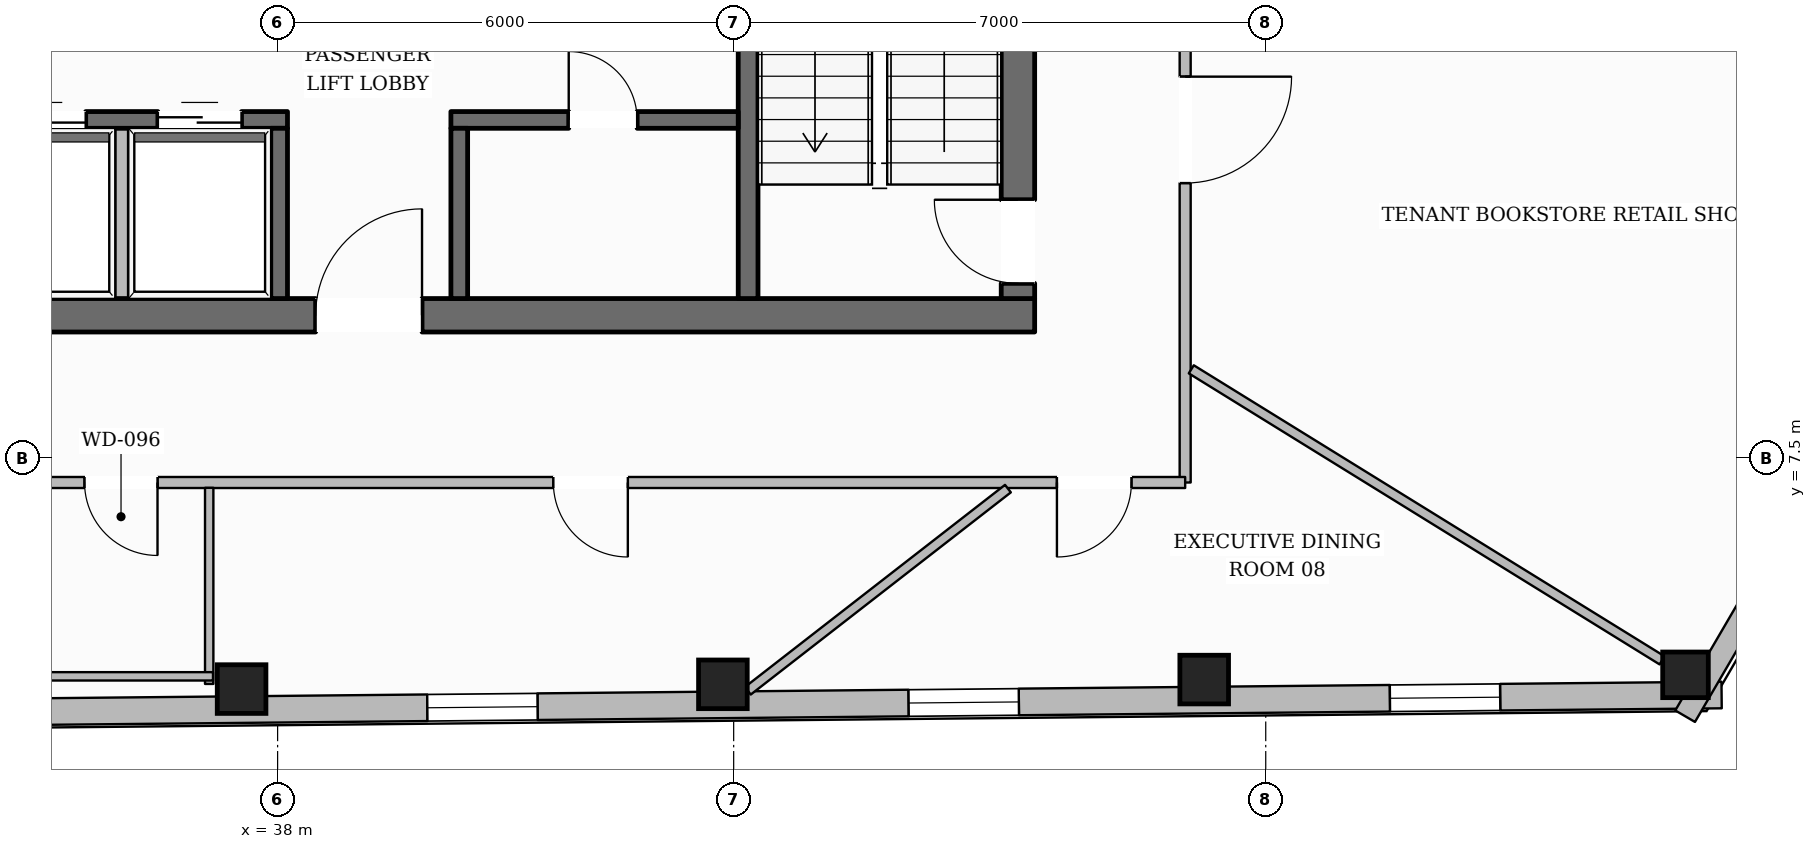
"""IFC4 building model, lengths in metres.
Left out: names, types, materials, properties, quantities, classifications, styles, units other than length and angle.
Written with IfcOpenShell. Run it as: python <this file> out.ifc"""

import sys

from ifc_helpers import new_model, si_unit, direction, frame, frame_2d, origin, origin_2d, place, context, subcontext, project, spatial, rectangle, hollow_rectangle, extrude, element, fill, save


model = new_model("IFC4")
c1 = context("Model", 3, precision=1e-05, world=origin(), true_north=direction((0.0, 1.0)))
c2 = subcontext(c1, "Body", "Model", "MODEL_VIEW")
j1 = project(units=[si_unit("LENGTHUNIT", "METRE"), si_unit("PLANEANGLEUNIT", "RADIAN")], contexts=[c1])
p1 = place(None, origin())
s1 = spatial("IfcSite", under=j1, at=p1, CompositionType="ELEMENT")
p2 = place(p1, origin())
s2 = spatial("IfcBuilding", under=s1, at=p2, CompositionType="ELEMENT")
p3 = place(p2, frame((0.0, 0.0, 218.9)))
s3 = spatial("IfcBuildingStorey", under=s2, at=p3, CompositionType="ELEMENT", Elevation=218.9)
p4 = place(p3, frame((28.04, 9.38, 0.0), z_axis=(0.0, 0.0, 1.0), x_axis=(1.0, 0.0, 0.0)))
e1 = element("IfcWall", 1, at=p4, inside=s3, PredefinedType="SOLIDWALL", context=c2, shape_type="SweptSolid", body=[
    extrude(rectangle(XDim=19.92, YDim=0.44, at=frame_2d((9.96, 0.0))), origin(), (0.0, 0.0, 1.0), 3.6),
])
p5 = place(p4, frame((10.46, 0.0, 0.0)))
e2 = element("IfcOpeningElement", 2, at=p5, cuts=e1, PredefinedType="OPENING", context=c2, shape_type="SweptSolid", body=[
    extrude(rectangle(XDim=1.4, YDim=2.2, at=frame_2d((0.7, 1.1))), frame((0.0, 0.23, 0.0), z_axis=(0.0, -1.0, 0.0), x_axis=(1.0, 0.0, 0.0)), (0.0, 0.0, 1.0), 0.46),
])
p6 = place(p3, frame((47.74, 9.6, 0.0), z_axis=(0.0, 0.0, 1.0), x_axis=(0.0, 1.0, 0.0)))
e3 = element("IfcWall", 3, at=p6, inside=s3, PredefinedType="SOLIDWALL", context=c2, shape_type="SweptSolid", body=[
    extrude(rectangle(XDim=13.0, YDim=0.44, at=frame_2d((6.5, 0.0))), origin(), (0.0, 0.0, 1.0), 3.6),
])
p7 = place(p6, frame((0.2, 0.0, 0.0)))
e4 = element("IfcOpeningElement", 4, at=p7, cuts=e3, PredefinedType="OPENING", context=c2, shape_type="SweptSolid", body=[
    extrude(rectangle(XDim=1.1, YDim=2.15, at=frame_2d((0.55, 1.075))), frame((0.0, 0.23, 0.0), z_axis=(0.0, -1.0, 0.0), x_axis=(1.0, 0.0, 0.0)), (0.0, 0.0, 1.0), 0.46),
])
p8 = place(p6, frame((8.4, 0.0, 0.0)))
e5 = element("IfcOpeningElement", 5, at=p8, cuts=e3, PredefinedType="OPENING", context=c2, shape_type="SweptSolid", body=[
    extrude(rectangle(XDim=0.9, YDim=2.1, at=frame_2d((0.45, 1.05))), frame((0.0, 0.23, 0.0), z_axis=(0.0, -1.0, 0.0), x_axis=(1.0, 0.0, 0.0)), (0.0, 0.0, 1.0), 0.46),
])
p9 = place(p3, frame((44.19, 9.6, 0.0), z_axis=(0.0, 0.0, 1.0), x_axis=(0.0, 1.0, 0.0)))
e6 = element("IfcWall", 6, at=p9, inside=s3, PredefinedType="SHEAR", context=c2, shape_type="SweptSolid", body=[
    extrude(rectangle(XDim=13.0, YDim=0.26, at=frame_2d((6.5, 0.0))), origin(), (0.0, 0.0, 1.0), 3.6),
])
p10 = place(p9, frame((10.925, 0.0, 0.0)))
e7 = element("IfcOpeningElement", 7, at=p10, cuts=e6, PredefinedType="OPENING", context=c2, shape_type="SweptSolid", body=[
    extrude(rectangle(XDim=1.25, YDim=2.25, at=frame_2d((0.625, 1.125))), frame((0.0, 0.14, 0.0), z_axis=(0.0, -1.0, 0.0), x_axis=(1.0, 0.0, 0.0)), (0.0, 0.0, 1.0), 0.28),
])
p11 = place(p3, frame((31.94, 11.95, 0.0), z_axis=(0.0, 0.0, 1.0), x_axis=(1.0, 0.0, 0.0)))
e8 = element("IfcWall", 8, at=p11, inside=s3, PredefinedType="SOLIDWALL", context=c2, shape_type="SweptSolid", body=[
    extrude(rectangle(XDim=6.19, YDim=0.22, at=frame_2d((3.095, 0.0))), origin(), (0.0, 0.0, 1.0), 3.6),
])
p12 = place(p11, frame((0.385, 0.0, 0.0)))
e9 = element("IfcOpeningElement", 9, at=p12, cuts=e8, PredefinedType="OPENING", context=c2, shape_type="SweptSolid", body=[
    extrude(rectangle(XDim=1.1, YDim=2.2, at=frame_2d((0.55, 1.1))), frame((0.0, 0.12, 0.0), z_axis=(0.0, -1.0, 0.0), x_axis=(1.0, 0.0, 0.0)), (0.0, 0.0, 1.0), 0.24),
])
p13 = place(p11, frame((2.435, 0.0, 0.0)))
e10 = element("IfcOpeningElement", 10, at=p13, cuts=e8, PredefinedType="OPENING", context=c2, shape_type="SweptSolid", body=[
    extrude(rectangle(XDim=1.1, YDim=2.2, at=frame_2d((0.55, 1.1))), frame((0.0, 0.12, 0.0), z_axis=(0.0, -1.0, 0.0), x_axis=(1.0, 0.0, 0.0)), (0.0, 0.0, 1.0), 0.24),
])
p14 = place(p11, frame((4.485, 0.0, 0.0)))
e11 = element("IfcOpeningElement", 11, at=p14, cuts=e8, PredefinedType="OPENING", context=c2, shape_type="SweptSolid", body=[
    extrude(rectangle(XDim=1.1, YDim=2.2, at=frame_2d((0.55, 1.1))), frame((0.0, 0.12, 0.0), z_axis=(0.0, -1.0, 0.0), x_axis=(1.0, 0.0, 0.0)), (0.0, 0.0, 1.0), 0.24),
])
p15 = place(p3, frame((40.28, 11.95, 0.0), z_axis=(0.0, 0.0, 1.0), x_axis=(1.0, 0.0, 0.0)))
e12 = element("IfcWall", 12, at=p15, inside=s3, PredefinedType="SOLIDWALL", context=c2, shape_type="SweptSolid", body=[
    extrude(rectangle(XDim=3.78, YDim=0.22, at=frame_2d((1.89, 0.0))), origin(), (0.0, 0.0, 1.0), 3.6),
])
p16 = place(p15, frame((1.55, 0.0, 0.0)))
e13 = element("IfcOpeningElement", 13, at=p16, cuts=e12, PredefinedType="OPENING", context=c2, shape_type="SweptSolid", body=[
    extrude(rectangle(XDim=0.9, YDim=2.1, at=frame_2d((0.45, 1.05))), frame((0.0, 0.12, 0.0), z_axis=(0.0, -1.0, 0.0), x_axis=(1.0, 0.0, 0.0)), (0.0, 0.0, 1.0), 0.24),
])
for number, where, z_axis, x_axis in (
    (14, (38.02, 9.6, 0.0), (0.0, 0.0, 1.0), (0.0, 1.0, 0.0)),
    (15, (40.39, 9.6, 0.0), (0.0, 0.0, 1.0), (0.0, 1.0, 0.0)),
):
    element("IfcWall", number, at=place(p3, frame(where, z_axis=z_axis, x_axis=x_axis)), inside=s3, PredefinedType="SOLIDWALL", context=c2, shape_type="SweptSolid", body=[
        extrude(rectangle(XDim=2.24, YDim=0.22, at=frame_2d((1.12, 0.0))), origin(), (0.0, 0.0, 1.0), 3.6),
    ])
for number, where, z_axis, x_axis in (
    (16, (37.526, 4.462, 0.0), (0.0, 0.0, 1.0), (1.0, 0.0, 0.0)),
    (17, (43.858, 4.525, 0.0), (0.0, 0.0, 1.0), (1.0, 0.0, 0.0)),
    (18, (50.19, 4.587, 0.0), (0.0, 0.0, 1.0), (1.0, 0.0, 0.0)),
):
    element("IfcColumn", number, at=place(p3, frame(where, z_axis=z_axis, x_axis=x_axis)), inside=s3, PredefinedType="COLUMN", context=c2, shape_type="SweptSolid", body=[
        extrude(hollow_rectangle(XDim=0.64, YDim=0.64, WallThickness=0.028, at=origin_2d()), origin(), (0.0, 0.0, 1.0), 3.6),
    ])
p17 = place(p3, frame((56.522, 4.65, 0.0), z_axis=(0.0, 0.0, 1.0), x_axis=(1.0, 0.0, 0.0)))
e19 = element("IfcColumn", 19, at=p17, inside=s3, PredefinedType="COLUMN", context=c2, shape_type="SweptSolid", body=[
    extrude(hollow_rectangle(XDim=0.6, YDim=0.6, WallThickness=0.028, at=origin_2d()), origin(), (0.0, 0.0, 1.0), 3.6),
])
p18 = place(p3, frame((56.998, 4.385, 0.0), z_axis=(0.0, 0.0, 1.0), x_axis=(-0.999951327982, -0.009866188108, 0.0)))
e20 = element("IfcWall", 20, at=p18, inside=s3, PredefinedType="STANDARD", context=c2, shape_type="SweptSolid", body=[
    extrude(rectangle(XDim=38.949, YDim=0.35, at=frame_2d((19.475, 0.0))), origin(), (0.0, 0.0, 1.0), 3.132),
])
p19 = place(p18, frame((34.576, 0.0, 0.65)))
e21 = element("IfcOpeningElement", 21, at=p19, cuts=e20, PredefinedType="OPENING", context=c2, shape_type="SweptSolid", body=[
    extrude(rectangle(XDim=1.45, YDim=1.75, at=frame_2d((0.725, 0.875))), frame((0.0, 0.185, 0.0), z_axis=(0.0, -1.0, 0.0), x_axis=(1.0, 0.0, 0.0)), (0.0, 0.0, 1.0), 0.37),
])
p20 = place(p18, frame((28.243, 0.0, 0.65)))
e22 = element("IfcOpeningElement", 22, at=p20, cuts=e20, PredefinedType="OPENING", context=c2, shape_type="SweptSolid", body=[
    extrude(rectangle(XDim=1.45, YDim=1.75, at=frame_2d((0.725, 0.875))), frame((0.0, 0.185, 0.0), z_axis=(0.0, -1.0, 0.0), x_axis=(1.0, 0.0, 0.0)), (0.0, 0.0, 1.0), 0.37),
])
p21 = place(p18, frame((15.579, 0.0, 0.65)))
e23 = element("IfcOpeningElement", 23, at=p21, cuts=e20, PredefinedType="OPENING", context=c2, shape_type="SweptSolid", body=[
    extrude(rectangle(XDim=1.45, YDim=1.75, at=frame_2d((0.725, 0.875))), frame((0.0, 0.185, 0.0), z_axis=(0.0, -1.0, 0.0), x_axis=(1.0, 0.0, 0.0)), (0.0, 0.0, 1.0), 0.37),
])
p22 = place(p18, frame((9.246, 0.0, 0.65)))
e24 = element("IfcOpeningElement", 24, at=p22, cuts=e20, PredefinedType="OPENING", context=c2, shape_type="SweptSolid", body=[
    extrude(rectangle(XDim=1.45, YDim=1.75, at=frame_2d((0.725, 0.875))), frame((0.0, 0.185, 0.0), z_axis=(0.0, -1.0, 0.0), x_axis=(1.0, 0.0, 0.0)), (0.0, 0.0, 1.0), 0.37),
])
p23 = place(p18, frame((2.914, 0.0, 0.65)))
e25 = element("IfcOpeningElement", 25, at=p23, cuts=e20, PredefinedType="OPENING", context=c2, shape_type="SweptSolid", body=[
    extrude(rectangle(XDim=1.45, YDim=1.75, at=frame_2d((0.725, 0.875))), frame((0.0, 0.185, 0.0), z_axis=(0.0, -1.0, 0.0), x_axis=(1.0, 0.0, 0.0)), (0.0, 0.0, 1.0), 0.37),
])
p24 = place(p3, frame((61.026, 11.828, 0.0), z_axis=(0.0, 0.0, 1.0), x_axis=(-0.504220681264, -0.863574840176, 0.0)))
e26 = element("IfcWall", 26, at=p24, inside=s3, PredefinedType="STANDARD", context=c2, shape_type="SweptSolid", body=[
    extrude(rectangle(XDim=8.942, YDim=0.3, at=frame_2d((4.471, 0.0))), origin(), (0.0, 0.0, 1.0), 3.132),
])
p25 = place(p24, frame((3.946, 0.0, 0.65)))
e27 = element("IfcOpeningElement", 27, at=p25, cuts=e26, PredefinedType="OPENING", context=c2, shape_type="SweptSolid", body=[
    extrude(rectangle(XDim=1.05, YDim=1.7, at=frame_2d((0.525, 0.85))), frame((0.0, 0.16, 0.0), z_axis=(0.0, -1.0, 0.0), x_axis=(1.0, 0.0, 0.0)), (0.0, 0.0, 1.0), 0.32),
])
p26 = place(p3, frame((41.881, 44.812, 0.0), z_axis=(0.0, 0.0, 1.0), x_axis=(0.495686807291, -0.868501346618, 0.0)))
e28 = element("IfcWall", 28, at=p26, inside=s3, PredefinedType="STANDARD", context=c2, shape_type="SweptSolid", body=[
    extrude(rectangle(XDim=38.618, YDim=0.35, at=frame_2d((19.309, 0.0))), origin(), (0.0, 0.0, 1.0), 3.132),
])
p27 = place(p26, frame((34.278, 0.0, 0.65)))
e29 = element("IfcOpeningElement", 29, at=p27, cuts=e28, PredefinedType="OPENING", context=c2, shape_type="SweptSolid", body=[
    extrude(rectangle(XDim=1.45, YDim=1.75, at=frame_2d((0.725, 0.875))), frame((0.0, 0.185, 0.0), z_axis=(0.0, -1.0, 0.0), x_axis=(1.0, 0.0, 0.0)), (0.0, 0.0, 1.0), 0.37),
])
p28 = place(p26, frame((28.001, 0.0, 0.65)))
e30 = element("IfcOpeningElement", 30, at=p28, cuts=e28, PredefinedType="OPENING", context=c2, shape_type="SweptSolid", body=[
    extrude(rectangle(XDim=1.45, YDim=1.75, at=frame_2d((0.725, 0.875))), frame((0.0, 0.185, 0.0), z_axis=(0.0, -1.0, 0.0), x_axis=(1.0, 0.0, 0.0)), (0.0, 0.0, 1.0), 0.37),
])
p29 = place(p26, frame((15.448, 0.0, 0.65)))
e31 = element("IfcOpeningElement", 31, at=p29, cuts=e28, PredefinedType="OPENING", context=c2, shape_type="SweptSolid", body=[
    extrude(rectangle(XDim=1.45, YDim=1.75, at=frame_2d((0.725, 0.875))), frame((0.0, 0.185, 0.0), z_axis=(0.0, -1.0, 0.0), x_axis=(1.0, 0.0, 0.0)), (0.0, 0.0, 1.0), 0.37),
])
p30 = place(p26, frame((9.172, 0.0, 0.65)))
e32 = element("IfcOpeningElement", 32, at=p30, cuts=e28, PredefinedType="OPENING", context=c2, shape_type="SweptSolid", body=[
    extrude(rectangle(XDim=1.45, YDim=1.75, at=frame_2d((0.725, 0.875))), frame((0.0, 0.185, 0.0), z_axis=(0.0, -1.0, 0.0), x_axis=(1.0, 0.0, 0.0)), (0.0, 0.0, 1.0), 0.37),
])
p31 = place(p26, frame((2.895, 0.0, 0.65)))
e33 = element("IfcOpeningElement", 33, at=p31, cuts=e28, PredefinedType="OPENING", context=c2, shape_type="SweptSolid", body=[
    extrude(rectangle(XDim=1.45, YDim=1.75, at=frame_2d((0.725, 0.875))), frame((0.0, 0.185, 0.0), z_axis=(0.0, -1.0, 0.0), x_axis=(1.0, 0.0, 0.0)), (0.0, 0.0, 1.0), 0.37),
])
p32 = place(p3, frame((35.95, 9.52, 0.0), z_axis=(0.0, 0.0, 1.0), x_axis=(0.0, 1.0, 0.0)))
e34 = element("IfcWall", 34, at=p32, inside=s3, PredefinedType="PARTITIONING", context=c2, shape_type="SweptSolid", body=[
    extrude(rectangle(XDim=2.32, YDim=0.165, at=frame_2d((1.16, 0.0))), origin(), (0.0, 0.0, 1.0), 3.6),
])
p33 = place(p3, frame((49.94, 15.1, 0.0), z_axis=(0.0, 0.0, 1.0), x_axis=(0.0, -1.0, 0.0)))
e35 = element("IfcWall", 35, at=p33, inside=s3, PredefinedType="PARTITIONING", context=c2, shape_type="SweptSolid", body=[
    extrude(rectangle(XDim=7.92, YDim=0.145, at=frame_2d((3.96, 0.0))), origin(), (0.0, 0.0, 1.0), 3.6),
])
p34 = place(p33, frame((2.581, 0.0, 0.0)))
e36 = element("IfcOpeningElement", 36, at=p34, cuts=e35, PredefinedType="OPENING", context=c2, shape_type="SweptSolid", body=[
    extrude(rectangle(XDim=1.4, YDim=2.2, at=frame_2d((0.7, 1.1))), frame((0.0, 0.083, 0.0), z_axis=(0.0, -1.0, 0.0), x_axis=(1.0, 0.0, 0.0)), (0.0, 0.0, 1.0), 0.165),
])
p35 = place(p3, frame((49.94, 7.18, 0.0), z_axis=(0.0, 0.0, 1.0), x_axis=(-1.0, 0.0, 0.0)))
e37 = element("IfcWall", 37, at=p35, inside=s3, PredefinedType="PARTITIONING", context=c2, shape_type="SweptSolid", body=[
    extrude(rectangle(XDim=23.88, YDim=0.145, at=frame_2d((11.94, 0.0))), origin(), (0.0, 0.0, 1.0), 3.6),
])
p36 = place(p35, frame((18.5, 0.0, 0.0)))
e38 = element("IfcOpeningElement", 38, at=p36, cuts=e37, PredefinedType="OPENING", context=c2, shape_type="SweptSolid", body=[
    extrude(rectangle(XDim=0.88, YDim=2.1, at=frame_2d((0.44, 1.05))), frame((0.0, 0.083, 0.0), z_axis=(0.0, -1.0, 0.0), x_axis=(1.0, 0.0, 0.0)), (0.0, 0.0, 1.0), 0.165),
])
p37 = place(p35, frame((15.98, 0.0, 0.0)))
e39 = element("IfcOpeningElement", 39, at=p37, cuts=e37, PredefinedType="OPENING", context=c2, shape_type="SweptSolid", body=[
    extrude(rectangle(XDim=0.88, YDim=2.1, at=frame_2d((0.44, 1.05))), frame((0.0, 0.083, 0.0), z_axis=(0.0, -1.0, 0.0), x_axis=(1.0, 0.0, 0.0)), (0.0, 0.0, 1.0), 0.165),
])
p38 = place(p35, frame((13.52, 0.0, 0.0)))
e40 = element("IfcOpeningElement", 40, at=p38, cuts=e37, PredefinedType="OPENING", context=c2, shape_type="SweptSolid", body=[
    extrude(rectangle(XDim=0.96, YDim=2.1, at=frame_2d((0.48, 1.05))), frame((0.0, 0.083, 0.0), z_axis=(0.0, -1.0, 0.0), x_axis=(1.0, 0.0, 0.0)), (0.0, 0.0, 1.0), 0.165),
])
p39 = place(p35, frame((7.332, 0.0, 0.0)))
e41 = element("IfcOpeningElement", 41, at=p39, cuts=e37, PredefinedType="OPENING", context=c2, shape_type="SweptSolid", body=[
    extrude(rectangle(XDim=0.98, YDim=2.15, at=frame_2d((0.49, 1.075))), frame((0.0, 0.083, 0.0), z_axis=(0.0, -1.0, 0.0), x_axis=(1.0, 0.0, 0.0)), (0.0, 0.0, 1.0), 0.165),
])
p40 = place(p35, frame((0.707, 0.0, 0.0)))
e42 = element("IfcOpeningElement", 42, at=p40, cuts=e37, PredefinedType="OPENING", context=c2, shape_type="SweptSolid", body=[
    extrude(rectangle(XDim=0.98, YDim=2.15, at=frame_2d((0.49, 1.075))), frame((0.0, 0.083, 0.0), z_axis=(0.0, -1.0, 0.0), x_axis=(1.0, 0.0, 0.0)), (0.0, 0.0, 1.0), 0.165),
])
p41 = place(p3, frame((37.1, 4.53, 0.0), z_axis=(0.0, 0.0, 1.0), x_axis=(0.0, 1.0, 0.0)))
e43 = element("IfcWall", 43, at=p41, inside=s3, PredefinedType="PLUMBINGWALL", context=c2, shape_type="SweptSolid", body=[
    extrude(rectangle(XDim=2.58, YDim=0.11, at=frame_2d((1.29, 0.0))), origin(), (0.0, 0.0, 1.0), 3.6),
])
p42 = place(p3, frame((29.69, 4.63, 0.0), z_axis=(0.0, 0.0, 1.0), x_axis=(1.0, 0.0, 0.0)))
e44 = element("IfcWall", 44, at=p42, inside=s3, PredefinedType="PLUMBINGWALL", context=c2, shape_type="SweptSolid", body=[
    extrude(rectangle(XDim=7.46, YDim=0.11, at=frame_2d((3.73, 0.0))), origin(), (0.0, 0.0, 1.0), 3.135),
])
p43 = place(p3, frame((50.021, 8.669, 0.0), z_axis=(0.0, 0.0, 1.0), x_axis=(0.850592933727, -0.525824743706, 0.0)))
e45 = element("IfcWall", 45, at=p43, inside=s3, PredefinedType="PARTITIONING", context=c2, shape_type="SweptSolid", body=[
    extrude(rectangle(XDim=7.282, YDim=0.125, at=frame_2d((3.641, 0.0))), origin(), (0.0, 0.0, 1.0), 3.141),
])
p44 = place(p3, frame((44.186, 4.44, 0.0), z_axis=(0.0, 0.0, 1.0), x_axis=(0.789546292068, 0.613691007496, 0.0)))
e46 = element("IfcWall", 46, at=p44, inside=s3, PredefinedType="PARTITIONING", context=c2, shape_type="SweptSolid", body=[
    extrude(rectangle(XDim=4.334, YDim=0.125, at=frame_2d((2.167, 0.0))), origin(), (0.0, 0.0, 1.0), 3.6),
])
p45 = place(p21, origin())
e47 = element("IfcWindow", 47, at=p45, inside=s3, PartitioningType="SINGLE_PANEL", PredefinedType="WINDOW", context=c2, shape_type="SweptSolid", body=[
    extrude(rectangle(XDim=1.45, YDim=1.75, at=frame_2d((0.725, 0.875))), frame((0.0, 0.03, 0.0), z_axis=(0.0, -1.0, 0.0), x_axis=(1.0, 0.0, 0.0)), (0.0, 0.0, 1.0), 0.06),
])
fill(e23, e47)
p46 = place(p22, origin())
e48 = element("IfcWindow", 48, at=p46, inside=s3, PartitioningType="SINGLE_PANEL", PredefinedType="WINDOW", context=c2, shape_type="SweptSolid", body=[
    extrude(rectangle(XDim=1.45, YDim=1.75, at=frame_2d((0.725, 0.875))), frame((0.0, 0.03, 0.0), z_axis=(0.0, -1.0, 0.0), x_axis=(1.0, 0.0, 0.0)), (0.0, 0.0, 1.0), 0.06),
])
fill(e24, e48)
p47 = place(p23, origin())
e49 = element("IfcWindow", 49, at=p47, inside=s3, PartitioningType="SINGLE_PANEL", PredefinedType="WINDOW", context=c2, shape_type="SweptSolid", body=[
    extrude(rectangle(XDim=1.45, YDim=1.75, at=frame_2d((0.725, 0.875))), frame((0.0, 0.03, 0.0), z_axis=(0.0, -1.0, 0.0), x_axis=(1.0, 0.0, 0.0)), (0.0, 0.0, 1.0), 0.06),
])
fill(e25, e49)
p48 = place(p7, origin())
e50 = element("IfcDoor", 50, at=p48, inside=s3, OperationType="SINGLE_SWING_RIGHT", PredefinedType="DOOR", context=c2, shape_type="SweptSolid", body=[
    extrude(rectangle(XDim=1.1, YDim=2.15, at=frame_2d((0.55, 1.075))), frame((0.0, 0.025, 0.0), z_axis=(0.0, -1.0, 0.0), x_axis=(1.0, 0.0, 0.0)), (0.0, 0.0, 1.0), 0.05),
])
fill(e4, e50)
p49 = place(p5, origin())
e51 = element("IfcDoor", 51, at=p49, inside=s3, OperationType="SINGLE_SWING_RIGHT", PredefinedType="DOOR", context=c2, shape_type="SweptSolid", body=[
    extrude(rectangle(XDim=1.4, YDim=2.2, at=frame_2d((0.7, 1.1))), frame((0.0, 0.025, 0.0), z_axis=(0.0, -1.0, 0.0), x_axis=(1.0, 0.0, 0.0)), (0.0, 0.0, 1.0), 0.05),
])
fill(e2, e51)
p50 = place(p13, origin())
e52 = element("IfcDoor", 52, at=p50, inside=s3, OperationType="DOUBLE_DOOR_SLIDING", PredefinedType="DOOR", context=c2, shape_type="SweptSolid", body=[
    extrude(rectangle(XDim=1.1, YDim=2.2, at=frame_2d((0.55, 1.1))), frame((0.0, 0.025, 0.0), z_axis=(0.0, -1.0, 0.0), x_axis=(1.0, 0.0, 0.0)), (0.0, 0.0, 1.0), 0.05),
])
fill(e10, e52)
p51 = place(p14, origin())
e53 = element("IfcDoor", 53, at=p51, inside=s3, OperationType="DOUBLE_DOOR_SLIDING", PredefinedType="DOOR", context=c2, shape_type="SweptSolid", body=[
    extrude(rectangle(XDim=1.1, YDim=2.2, at=frame_2d((0.55, 1.1))), frame((0.0, 0.025, 0.0), z_axis=(0.0, -1.0, 0.0), x_axis=(1.0, 0.0, 0.0)), (0.0, 0.0, 1.0), 0.05),
])
fill(e11, e53)
p52 = place(p16, origin())
e54 = element("IfcDoor", 54, at=p52, inside=s3, OperationType="SINGLE_SWING_LEFT", PredefinedType="DOOR", context=c2, shape_type="SweptSolid", body=[
    extrude(rectangle(XDim=0.9, YDim=2.1, at=frame_2d((0.45, 1.05))), frame((0.0, 0.025, 0.0), z_axis=(0.0, -1.0, 0.0), x_axis=(1.0, 0.0, 0.0)), (0.0, 0.0, 1.0), 0.05),
])
fill(e13, e54)
p53 = place(p38, origin())
e55 = element("IfcDoor", 55, at=p53, inside=s3, OperationType="SINGLE_SWING_LEFT", PredefinedType="DOOR", context=c2, shape_type="SweptSolid", body=[
    extrude(rectangle(XDim=0.96, YDim=2.1, at=frame_2d((0.48, 1.05))), frame((0.0, 0.025, 0.0), z_axis=(0.0, -1.0, 0.0), x_axis=(1.0, 0.0, 0.0)), (0.0, 0.0, 1.0), 0.05),
])
fill(e40, e55)
p54 = place(p39, origin())
e56 = element("IfcDoor", 56, at=p54, inside=s3, OperationType="SINGLE_SWING_LEFT", PredefinedType="DOOR", context=c2, shape_type="SweptSolid", body=[
    extrude(rectangle(XDim=0.98, YDim=2.15, at=frame_2d((0.49, 1.075))), frame((0.0, 0.025, 0.0), z_axis=(0.0, -1.0, 0.0), x_axis=(1.0, 0.0, 0.0)), (0.0, 0.0, 1.0), 0.05),
])
fill(e41, e56)
p55 = place(p40, origin())
e57 = element("IfcDoor", 57, at=p55, inside=s3, OperationType="SINGLE_SWING_RIGHT", PredefinedType="DOOR", context=c2, shape_type="SweptSolid", body=[
    extrude(rectangle(XDim=0.98, YDim=2.15, at=frame_2d((0.49, 1.075))), frame((0.0, 0.025, 0.0), z_axis=(0.0, -1.0, 0.0), x_axis=(1.0, 0.0, 0.0)), (0.0, 0.0, 1.0), 0.05),
])
fill(e42, e57)
p56 = place(p34, origin())
e58 = element("IfcDoor", 58, at=p56, inside=s3, OperationType="SINGLE_SWING_LEFT", PredefinedType="DOOR", context=c2, shape_type="SweptSolid", body=[
    extrude(rectangle(XDim=1.4, YDim=2.2, at=frame_2d((0.7, 1.1))), frame((0.0, 0.025, 0.0), z_axis=(0.0, -1.0, 0.0), x_axis=(1.0, 0.0, 0.0)), (0.0, 0.0, 1.0), 0.05),
])
fill(e36, e58)
save(model, sys.argv[1])
